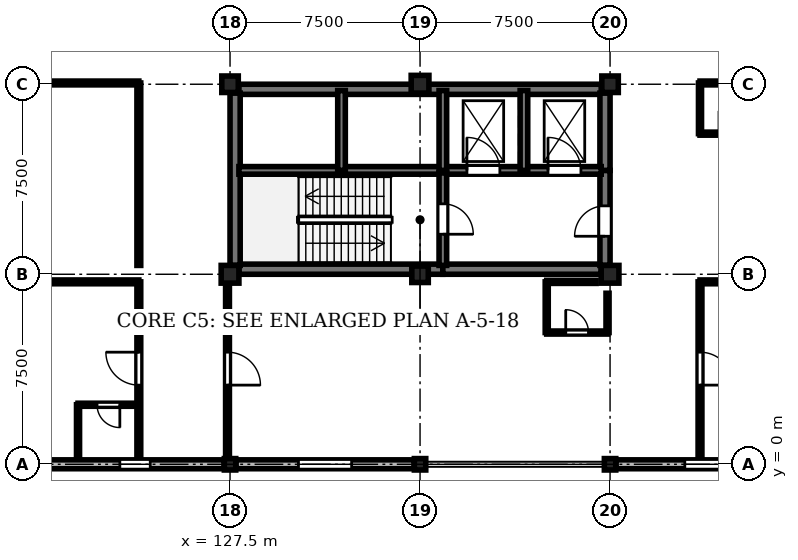
"""IFC4 building model, lengths in metres.
Left out: names, types, materials, properties, quantities, classifications, styles, units other than length and angle.
Written with IfcOpenShell. Run it as: python <this file> out.ifc"""

import sys

from ifc_helpers import new_model, si_unit, direction, frame, frame_2d, origin, origin_2d, place, context, subcontext, project, spatial, rectangle, extrude, element, fill, save


model = new_model("IFC4")
c1 = context("Model", 3, precision=1e-05, world=origin(), true_north=direction((0.0, 1.0)))
c2 = subcontext(c1, "Body", "Model", "MODEL_VIEW")
j1 = project(units=[si_unit("LENGTHUNIT", "METRE"), si_unit("PLANEANGLEUNIT", "RADIAN")], contexts=[c1])
p1 = place(None, origin())
s1 = spatial("IfcSite", under=j1, at=p1, CompositionType="ELEMENT")
p2 = place(p1, origin())
s2 = spatial("IfcBuilding", under=s1, at=p2, CompositionType="ELEMENT")
p3 = place(p2, frame((0.0, 0.0, 9.3)))
s3 = spatial("IfcBuildingStorey", under=s2, at=p3, CompositionType="ELEMENT", Elevation=9.3)
p4 = place(p3, frame((127.5, 0.0, 0.0), z_axis=(0.0, 0.0, 1.0), x_axis=(1.0, 0.0, 0.0)))
e1 = element("IfcColumn", 1, at=p4, inside=s3, PredefinedType="COLUMN", context=c2, shape_type="SweptSolid", body=[
    extrude(rectangle(XDim=0.45, YDim=0.45, at=origin_2d()), origin(), (0.0, 0.0, 1.0), 4.8),
])
p5 = place(p3, frame((127.5, 7.5, 0.0), z_axis=(0.0, 0.0, 1.0), x_axis=(1.0, 0.0, 0.0)))
e2 = element("IfcColumn", 2, at=p5, inside=s3, PredefinedType="COLUMN", context=c2, shape_type="SweptSolid", body=[
    extrude(rectangle(XDim=0.7, YDim=0.7, at=origin_2d()), origin(), (0.0, 0.0, 1.0), 4.8),
])
p6 = place(p3, frame((127.5, 15.0, 0.0), z_axis=(0.0, 0.0, 1.0), x_axis=(1.0, 0.0, 0.0)))
e3 = element("IfcColumn", 3, at=p6, inside=s3, PredefinedType="COLUMN", context=c2, shape_type="SweptSolid", body=[
    extrude(rectangle(XDim=0.65, YDim=0.65, at=origin_2d()), origin(), (0.0, 0.0, 1.0), 4.8),
])
p7 = place(p3, frame((135.0, 0.0, 0.0), z_axis=(0.0, 0.0, 1.0), x_axis=(1.0, 0.0, 0.0)))
e4 = element("IfcColumn", 4, at=p7, inside=s3, PredefinedType="COLUMN", context=c2, shape_type="SweptSolid", body=[
    extrude(rectangle(XDim=0.45, YDim=0.45, at=origin_2d()), origin(), (0.0, 0.0, 1.0), 4.8),
])
p8 = place(p3, frame((135.0, 7.5, 0.0), z_axis=(0.0, 0.0, 1.0), x_axis=(1.0, 0.0, 0.0)))
e5 = element("IfcColumn", 5, at=p8, inside=s3, PredefinedType="COLUMN", context=c2, shape_type="SweptSolid", body=[
    extrude(rectangle(XDim=0.65, YDim=0.65, at=origin_2d()), origin(), (0.0, 0.0, 1.0), 4.8),
])
p9 = place(p3, frame((135.0, 15.0, 0.0), z_axis=(0.0, 0.0, 1.0), x_axis=(1.0, 0.0, 0.0)))
e6 = element("IfcColumn", 6, at=p9, inside=s3, PredefinedType="COLUMN", context=c2, shape_type="SweptSolid", body=[
    extrude(rectangle(XDim=0.7, YDim=0.7, at=origin_2d()), origin(), (0.0, 0.0, 1.0), 4.8),
])
p10 = place(p3, frame((142.5, 0.0, 0.0), z_axis=(0.0, 0.0, 1.0), x_axis=(1.0, 0.0, 0.0)))
e7 = element("IfcColumn", 7, at=p10, inside=s3, PredefinedType="COLUMN", context=c2, shape_type="SweptSolid", body=[
    extrude(rectangle(XDim=0.45, YDim=0.45, at=origin_2d()), origin(), (0.0, 0.0, 1.0), 4.8),
])
p11 = place(p3, frame((142.5, 7.5, 0.0), z_axis=(0.0, 0.0, 1.0), x_axis=(1.0, 0.0, 0.0)))
e8 = element("IfcColumn", 8, at=p11, inside=s3, PredefinedType="COLUMN", context=c2, shape_type="SweptSolid", body=[
    extrude(rectangle(XDim=0.7, YDim=0.7, at=origin_2d()), origin(), (0.0, 0.0, 1.0), 4.8),
])
p12 = place(p3, frame((142.5, 15.0, 0.0), z_axis=(0.0, 0.0, 1.0), x_axis=(1.0, 0.0, 0.0)))
e9 = element("IfcColumn", 9, at=p12, inside=s3, PredefinedType="COLUMN", context=c2, shape_type="SweptSolid", body=[
    extrude(rectangle(XDim=0.65, YDim=0.65, at=origin_2d()), origin(), (0.0, 0.0, 1.0), 4.8),
])
p13 = place(p3, frame((127.265, 0.0, 0.0), z_axis=(0.0, 0.0, 1.0), x_axis=(-1.0, 0.0, 0.0)))
e10 = element("IfcWall", 10, at=p13, inside=s3, PredefinedType="STANDARD", context=c2, shape_type="SweptSolid", body=[
    extrude(rectangle(XDim=7.03, YDim=0.35, at=frame_2d((3.515, 0.0))), origin(), (0.0, 0.0, 1.0), 3.95),
])
p14 = place(p13, frame((2.915, 0.0, 0.9)))
e11 = element("IfcOpeningElement", 11, at=p14, cuts=e10, PredefinedType="OPENING", context=c2, shape_type="SweptSolid", body=[
    extrude(rectangle(XDim=1.2, YDim=2.1, at=frame_2d((0.6, 1.05))), frame((0.0, 0.185, 0.0), z_axis=(0.0, -1.0, 0.0), x_axis=(1.0, 0.0, 0.0)), (0.0, 0.0, 1.0), 0.37),
])
p15 = place(p3, frame((134.765, 0.0, 0.0), z_axis=(0.0, 0.0, 1.0), x_axis=(-1.0, 0.0, 0.0)))
e12 = element("IfcWall", 12, at=p15, inside=s3, PredefinedType="STANDARD", context=c2, shape_type="SweptSolid", body=[
    extrude(rectangle(XDim=7.03, YDim=0.35, at=frame_2d((3.515, 0.0))), origin(), (0.0, 0.0, 1.0), 3.95),
])
p16 = place(p15, frame((2.465, 0.0, 0.9)))
e13 = element("IfcOpeningElement", 13, at=p16, cuts=e12, PredefinedType="OPENING", context=c2, shape_type="SweptSolid", body=[
    extrude(rectangle(XDim=2.1, YDim=2.1, at=frame_2d((1.05, 1.05))), frame((0.0, 0.185, 0.0), z_axis=(0.0, -1.0, 0.0), x_axis=(1.0, 0.0, 0.0)), (0.0, 0.0, 1.0), 0.37),
])
p17 = place(p3, frame((149.765, 0.0, 0.0), z_axis=(0.0, 0.0, 1.0), x_axis=(-1.0, 0.0, 0.0)))
e14 = element("IfcWall", 14, at=p17, inside=s3, PredefinedType="STANDARD", context=c2, shape_type="SweptSolid", body=[
    extrude(rectangle(XDim=7.03, YDim=0.35, at=frame_2d((3.515, 0.0))), origin(), (0.0, 0.0, 1.0), 3.95),
])
p18 = place(p17, frame((2.715, 0.0, 0.9)))
e15 = element("IfcOpeningElement", 15, at=p18, cuts=e14, PredefinedType="OPENING", context=c2, shape_type="SweptSolid", body=[
    extrude(rectangle(XDim=1.6, YDim=1.95, at=frame_2d((0.8, 0.975))), frame((0.0, 0.185, 0.0), z_axis=(0.0, -1.0, 0.0), x_axis=(1.0, 0.0, 0.0)), (0.0, 0.0, 1.0), 0.37),
])
p19 = place(p3, frame((127.85, 7.7, 0.0), z_axis=(0.0, 0.0, 1.0), x_axis=(1.0, 0.0, 0.0)))
e16 = element("IfcWall", 16, at=p19, inside=s3, PredefinedType="SHEAR", context=c2, shape_type="SweptSolid", body=[
    extrude(rectangle(XDim=8.05, YDim=0.4, at=frame_2d((4.025, 0.0))), origin(), (0.0, 0.0, 1.0), 4.55),
])
p20 = place(p3, frame((135.9, 7.7, 0.0), z_axis=(0.0, 0.0, 1.0), x_axis=(1.0, 0.0, 0.0)))
e17 = element("IfcWall", 17, at=p20, inside=s3, PredefinedType="SHEAR", context=c2, shape_type="SweptSolid", body=[
    extrude(rectangle(XDim=6.25, YDim=0.4, at=frame_2d((3.125, 0.0))), origin(), (0.0, 0.0, 1.0), 4.55),
])
p21 = place(p3, frame((127.85, 14.8, 0.0), z_axis=(0.0, 0.0, 1.0), x_axis=(1.0, 0.0, 0.0)))
e18 = element("IfcWall", 18, at=p21, inside=s3, PredefinedType="SHEAR", context=c2, shape_type="SweptSolid", body=[
    extrude(rectangle(XDim=14.3, YDim=0.4, at=frame_2d((7.15, 0.0))), origin(), (0.0, 0.0, 1.0), 4.55),
])
p22 = place(p3, frame((127.7, 7.85, 0.0), z_axis=(0.0, 0.0, 1.0), x_axis=(0.0, 1.0, 0.0)))
e19 = element("IfcWall", 19, at=p22, inside=s3, PredefinedType="SHEAR", context=c2, shape_type="SweptSolid", body=[
    extrude(rectangle(XDim=6.8, YDim=0.4, at=frame_2d((3.4, 0.0))), origin(), (0.0, 0.0, 1.0), 4.55),
])
p23 = place(p3, frame((142.3, 7.85, 0.0), z_axis=(0.0, 0.0, 1.0), x_axis=(0.0, 1.0, 0.0)))
e20 = element("IfcWall", 20, at=p23, inside=s3, PredefinedType="SHEAR", context=c2, shape_type="SweptSolid", body=[
    extrude(rectangle(XDim=3.75, YDim=0.4, at=frame_2d((1.875, 0.0))), origin(), (0.0, 0.0, 1.0), 4.55),
])
p24 = place(p23, frame((1.15, 0.0, 0.0)))
e21 = element("IfcOpeningElement", 21, at=p24, cuts=e20, PredefinedType="OPENING", context=c2, shape_type="SweptSolid", body=[
    extrude(rectangle(XDim=1.2, YDim=2.25, at=frame_2d((0.6, 1.125))), frame((0.0, 0.21, 0.0), z_axis=(0.0, -1.0, 0.0), x_axis=(1.0, 0.0, 0.0)), (0.0, 0.0, 1.0), 0.42),
])
p25 = place(p3, frame((142.3, 11.6, 0.0), z_axis=(0.0, 0.0, 1.0), x_axis=(0.0, 1.0, 0.0)))
e22 = element("IfcWall", 22, at=p25, inside=s3, PredefinedType="SHEAR", context=c2, shape_type="SweptSolid", body=[
    extrude(rectangle(XDim=3.05, YDim=0.4, at=frame_2d((1.525, 0.0))), origin(), (0.0, 0.0, 1.0), 4.55),
])
p26 = place(p3, frame((127.85, 11.6, 0.0), z_axis=(0.0, 0.0, 1.0), x_axis=(1.0, 0.0, 0.0)))
e23 = element("IfcWall", 23, at=p26, inside=s3, PredefinedType="SHEAR", context=c2, shape_type="SweptSolid", body=[
    extrude(rectangle(XDim=8.05, YDim=0.3, at=frame_2d((4.025, 0.0))), origin(), (0.0, 0.0, 1.0), 4.55),
])
p27 = place(p3, frame((135.9, 11.6, 0.0), z_axis=(0.0, 0.0, 1.0), x_axis=(1.0, 0.0, 0.0)))
e24 = element("IfcWall", 24, at=p27, inside=s3, PredefinedType="SHEAR", context=c2, shape_type="SweptSolid", body=[
    extrude(rectangle(XDim=6.25, YDim=0.3, at=frame_2d((3.125, 0.0))), origin(), (0.0, 0.0, 1.0), 4.55),
])
p28 = place(p27, frame((0.95, 0.0, 0.0)))
e25 = element("IfcOpeningElement", 25, at=p28, cuts=e24, PredefinedType="OPENING", context=c2, shape_type="SweptSolid", body=[
    extrude(rectangle(XDim=1.3, YDim=2.2, at=frame_2d((0.65, 1.1))), frame((0.0, 0.16, 0.0), z_axis=(0.0, -1.0, 0.0), x_axis=(1.0, 0.0, 0.0)), (0.0, 0.0, 1.0), 0.32),
])
p29 = place(p27, frame((4.15, 0.0, 0.0)))
e26 = element("IfcOpeningElement", 26, at=p29, cuts=e24, PredefinedType="OPENING", context=c2, shape_type="SweptSolid", body=[
    extrude(rectangle(XDim=1.3, YDim=2.2, at=frame_2d((0.65, 1.1))), frame((0.0, 0.16, 0.0), z_axis=(0.0, -1.0, 0.0), x_axis=(1.0, 0.0, 0.0)), (0.0, 0.0, 1.0), 0.32),
])
p30 = place(p3, frame((135.9, 11.5, 0.0), z_axis=(0.0, 0.0, 1.0), x_axis=(0.0, -1.0, 0.0)))
e27 = element("IfcWall", 27, at=p30, inside=s3, PredefinedType="SHEAR", context=c2, shape_type="SweptSolid", body=[
    extrude(rectangle(XDim=3.65, YDim=0.3, at=frame_2d((1.825, 0.0))), origin(), (0.0, 0.0, 1.0), 4.55),
])
p31 = place(p30, frame((1.22, 0.0, 0.0)))
e28 = element("IfcOpeningElement", 28, at=p31, cuts=e27, PredefinedType="OPENING", context=c2, shape_type="SweptSolid", body=[
    extrude(rectangle(XDim=1.2, YDim=2.25, at=frame_2d((0.6, 1.125))), frame((0.0, 0.16, 0.0), z_axis=(0.0, -1.0, 0.0), x_axis=(1.0, 0.0, 0.0)), (0.0, 0.0, 1.0), 0.32),
])
for number, where, z_axis, x_axis in (
    (29, (131.9, 11.6, 0.0), (0.0, 0.0, 1.0), (0.0, 1.0, 0.0)),
    (30, (135.9, 11.6, 0.0), (0.0, 0.0, 1.0), (0.0, 1.0, 0.0)),
    (31, (139.1, 11.6, 0.0), (0.0, 0.0, 1.0), (0.0, 1.0, 0.0)),
):
    element("IfcWall", number, at=place(p3, frame(where, z_axis=z_axis, x_axis=x_axis)), inside=s3, PredefinedType="SHEAR", context=c2, shape_type="SweptSolid", body=[
        extrude(rectangle(XDim=3.15, YDim=0.3, at=frame_2d((1.575, 0.0))), origin(), (0.0, 0.0, 1.0), 4.55),
    ])
p32 = place(p3, frame((123.9, 0.35, 0.0), z_axis=(0.0, 0.0, 1.0), x_axis=(0.0, 1.0, 0.0)))
e32 = element("IfcWall", 32, at=p32, inside=s3, PredefinedType="PARTITIONING", context=c2, shape_type="SweptSolid", body=[
    extrude(rectangle(XDim=6.85, YDim=0.15, at=frame_2d((3.425, 0.0))), origin(), (0.0, 0.0, 1.0), 4.535),
])
p33 = place(p32, frame((2.775, 0.0, 0.0)))
e33 = element("IfcOpeningElement", 33, at=p33, cuts=e32, PredefinedType="OPENING", context=c2, shape_type="SweptSolid", body=[
    extrude(rectangle(XDim=1.3, YDim=2.2, at=frame_2d((0.65, 1.1))), frame((0.0, 0.085, 0.0), z_axis=(0.0, -1.0, 0.0), x_axis=(1.0, 0.0, 0.0)), (0.0, 0.0, 1.0), 0.17),
])
p34 = place(p3, frame((123.9, 2.35, 0.0), z_axis=(0.0, 0.0, 1.0), x_axis=(-1.0, 0.0, 0.0)))
e34 = element("IfcWall", 34, at=p34, inside=s3, PredefinedType="PARTITIONING", context=c2, shape_type="SweptSolid", body=[
    extrude(rectangle(XDim=2.4, YDim=0.12, at=frame_2d((1.2, 0.0))), origin(), (0.0, 0.0, 1.0), 4.535),
])
p35 = place(p34, frame((0.75, 0.0, 0.0)))
e35 = element("IfcOpeningElement", 35, at=p35, cuts=e34, PredefinedType="OPENING", context=c2, shape_type="SweptSolid", body=[
    extrude(rectangle(XDim=0.9, YDim=2.1, at=frame_2d((0.45, 1.05))), frame((0.0, 0.07, 0.0), z_axis=(0.0, -1.0, 0.0), x_axis=(1.0, 0.0, 0.0)), (0.0, 0.0, 1.0), 0.14),
])
p36 = place(p3, frame((121.5, 0.35, 0.0), z_axis=(0.0, 0.0, 1.0), x_axis=(0.0, 1.0, 0.0)))
e36 = element("IfcWall", 36, at=p36, inside=s3, PredefinedType="PARTITIONING", context=c2, shape_type="SweptSolid", body=[
    extrude(rectangle(XDim=2.0, YDim=0.12, at=frame_2d((1.0, 0.0))), origin(), (0.0, 0.0, 1.0), 4.535),
])
p37 = place(p3, frame((127.4, 7.2, 0.0), z_axis=(0.0, 0.0, 1.0), x_axis=(0.0, -1.0, 0.0)))
e37 = element("IfcWall", 37, at=p37, inside=s3, PredefinedType="PARTITIONING", context=c2, shape_type="SweptSolid", body=[
    extrude(rectangle(XDim=6.85, YDim=0.15, at=frame_2d((3.425, 0.0))), origin(), (0.0, 0.0, 1.0), 4.035),
])
p38 = place(p37, frame((2.775, 0.0, 0.0)))
e38 = element("IfcOpeningElement", 38, at=p38, cuts=e37, PredefinedType="OPENING", context=c2, shape_type="SweptSolid", body=[
    extrude(rectangle(XDim=1.3, YDim=2.2, at=frame_2d((0.65, 1.1))), frame((0.0, 0.085, 0.0), z_axis=(0.0, -1.0, 0.0), x_axis=(1.0, 0.0, 0.0)), (0.0, 0.0, 1.0), 0.17),
])
p39 = place(p3, frame((140.0, 5.2, 0.0), z_axis=(0.0, 0.0, 1.0), x_axis=(1.0, 0.0, 0.0)))
e39 = element("IfcWall", 39, at=p39, inside=s3, PredefinedType="PARTITIONING", context=c2, shape_type="SweptSolid", body=[
    extrude(rectangle(XDim=2.4, YDim=0.12, at=frame_2d((1.2, 0.0))), origin(), (0.0, 0.0, 1.0), 4.535),
])
p40 = place(p39, frame((0.75, 0.0, 0.0)))
e40 = element("IfcOpeningElement", 40, at=p40, cuts=e39, PredefinedType="OPENING", context=c2, shape_type="SweptSolid", body=[
    extrude(rectangle(XDim=0.9, YDim=2.1, at=frame_2d((0.45, 1.05))), frame((0.0, 0.07, 0.0), z_axis=(0.0, -1.0, 0.0), x_axis=(1.0, 0.0, 0.0)), (0.0, 0.0, 1.0), 0.14),
])
p41 = place(p3, frame((140.0, 5.2, 0.0), z_axis=(0.0, 0.0, 1.0), x_axis=(0.0, 1.0, 0.0)))
e41 = element("IfcWall", 41, at=p41, inside=s3, PredefinedType="PARTITIONING", context=c2, shape_type="SweptSolid", body=[
    extrude(rectangle(XDim=2.0, YDim=0.12, at=frame_2d((1.0, 0.0))), origin(), (0.0, 0.0, 1.0), 4.535),
])
p42 = place(p3, frame((146.05, 7.2, 0.0), z_axis=(0.0, 0.0, 1.0), x_axis=(0.0, -1.0, 0.0)))
e42 = element("IfcWall", 42, at=p42, inside=s3, PredefinedType="PARTITIONING", context=c2, shape_type="SweptSolid", body=[
    extrude(rectangle(XDim=6.85, YDim=0.15, at=frame_2d((3.425, 0.0))), origin(), (0.0, 0.0, 1.0), 4.535),
])
p43 = place(p42, frame((2.775, 0.0, 0.0)))
e43 = element("IfcOpeningElement", 43, at=p43, cuts=e42, PredefinedType="OPENING", context=c2, shape_type="SweptSolid", body=[
    extrude(rectangle(XDim=1.3, YDim=2.2, at=frame_2d((0.65, 1.1))), frame((0.0, 0.085, 0.0), z_axis=(0.0, -1.0, 0.0), x_axis=(1.0, 0.0, 0.0)), (0.0, 0.0, 1.0), 0.17),
])
p44 = place(p3, frame((172.15, 15.05, 0.0), z_axis=(0.0, 0.0, 1.0), x_axis=(-1.0, 0.0, 0.0)))
e44 = element("IfcWall", 44, at=p44, inside=s3, PredefinedType="PARTITIONING", context=c2, shape_type="SweptSolid", body=[
    extrude(rectangle(XDim=26.1, YDim=0.15, at=frame_2d((13.05, 0.0))), origin(), (0.0, 0.0, 1.0), 3.985),
])
p45 = place(p44, frame((2.68, 0.0, 0.0)))
e45 = element("IfcOpeningElement", 45, at=p45, cuts=e44, PredefinedType="OPENING", context=c2, shape_type="SweptSolid", body=[
    extrude(rectangle(XDim=1.3, YDim=2.2, at=frame_2d((0.65, 1.1))), frame((0.0, 0.085, 0.0), z_axis=(0.0, -1.0, 0.0), x_axis=(1.0, 0.0, 0.0)), (0.0, 0.0, 1.0), 0.17),
])
p46 = place(p3, frame((146.05, 13.05, 0.0), z_axis=(0.0, 0.0, 1.0), x_axis=(1.0, 0.0, 0.0)))
e46 = element("IfcWall", 46, at=p46, inside=s3, PredefinedType="PARTITIONING", context=c2, shape_type="SweptSolid", body=[
    extrude(rectangle(XDim=2.4, YDim=0.12, at=frame_2d((1.2, 0.0))), origin(), (0.0, 0.0, 1.0), 4.535),
])
p47 = place(p46, frame((0.75, 0.0, 0.0)))
e47 = element("IfcOpeningElement", 47, at=p47, cuts=e46, PredefinedType="OPENING", context=c2, shape_type="SweptSolid", body=[
    extrude(rectangle(XDim=0.9, YDim=2.1, at=frame_2d((0.45, 1.05))), frame((0.0, 0.07, 0.0), z_axis=(0.0, -1.0, 0.0), x_axis=(1.0, 0.0, 0.0)), (0.0, 0.0, 1.0), 0.14),
])
p48 = place(p3, frame((123.9, 15.05, 0.0), z_axis=(0.0, 0.0, 1.0), x_axis=(-1.0, 0.0, 0.0)))
e48 = element("IfcWall", 48, at=p48, inside=s3, PredefinedType="PARTITIONING", context=c2, shape_type="SweptSolid", body=[
    extrude(rectangle(XDim=11.05, YDim=0.15, at=frame_2d((5.525, 0.0))), origin(), (0.0, 0.0, 1.0), 3.985),
])
p49 = place(p48, frame((6.76, 0.0, 0.0)))
e49 = element("IfcOpeningElement", 49, at=p49, cuts=e48, PredefinedType="OPENING", context=c2, shape_type="SweptSolid", body=[
    extrude(rectangle(XDim=1.25, YDim=2.2, at=frame_2d((0.625, 1.1))), frame((0.0, 0.085, 0.0), z_axis=(0.0, -1.0, 0.0), x_axis=(1.0, 0.0, 0.0)), (0.0, 0.0, 1.0), 0.17),
])
p50 = place(p3, frame((112.85, 7.2, 0.0), z_axis=(0.0, 0.0, 1.0), x_axis=(1.0, 0.0, 0.0)))
e50 = element("IfcWall", 50, at=p50, inside=s3, PredefinedType="PARTITIONING", context=c2, shape_type="SweptSolid", body=[
    extrude(rectangle(XDim=11.05, YDim=0.15, at=frame_2d((5.525, 0.0))), origin(), (0.0, 0.0, 1.0), 3.985),
])
p51 = place(p3, frame((146.05, 7.2, 0.0), z_axis=(0.0, 0.0, 1.0), x_axis=(1.0, 0.0, 0.0)))
e51 = element("IfcWall", 51, at=p51, inside=s3, PredefinedType="PARTITIONING", context=c2, shape_type="SweptSolid", body=[
    extrude(rectangle(XDim=12.9, YDim=0.15, at=frame_2d((6.45, 0.0))), origin(), (0.0, 0.0, 1.0), 3.985),
])
p52 = place(p3, frame((123.9, 7.85, 0.0), z_axis=(0.0, 0.0, 1.0), x_axis=(0.0, 1.0, 0.0)))
e52 = element("IfcWall", 52, at=p52, inside=s3, PredefinedType="PARTITIONING", context=c2, shape_type="SweptSolid", body=[
    extrude(rectangle(XDim=7.2, YDim=0.15, at=frame_2d((3.6, 0.0))), origin(), (0.0, 0.0, 1.0), 4.535),
])
p53 = place(p3, frame((140.0, 7.2, 0.0), z_axis=(0.0, 0.0, 1.0), x_axis=(1.0, 0.0, 0.0)))
e53 = element("IfcWall", 53, at=p53, inside=s3, PredefinedType="PARTITIONING", context=c2, shape_type="SweptSolid", body=[
    extrude(rectangle(XDim=1.95, YDim=0.12, at=frame_2d((0.975, 0.0))), origin(), (0.0, 0.0, 1.0), 3.985),
])
p54 = place(p3, frame((142.4, 5.2, 0.0), z_axis=(0.0, 0.0, 1.0), x_axis=(0.0, 1.0, 0.0)))
e54 = element("IfcWall", 54, at=p54, inside=s3, PredefinedType="PARTITIONING", context=c2, shape_type="SweptSolid", body=[
    extrude(rectangle(XDim=1.55, YDim=0.12, at=frame_2d((0.775, 0.0))), origin(), (0.0, 0.0, 1.0), 4.035),
])
p55 = place(p3, frame((146.05, 13.05, 0.0), z_axis=(0.0, 0.0, 1.0), x_axis=(0.0, 1.0, 0.0)))
e55 = element("IfcWall", 55, at=p55, inside=s3, PredefinedType="PARTITIONING", context=c2, shape_type="SweptSolid", body=[
    extrude(rectangle(XDim=2.0, YDim=0.12, at=frame_2d((1.0, 0.0))), origin(), (0.0, 0.0, 1.0), 4.535),
])
p56 = place(p14, origin())
e56 = element("IfcWindow", 56, at=p56, inside=s3, PartitioningType="SINGLE_PANEL", PredefinedType="WINDOW", context=c2, shape_type="SweptSolid", body=[
    extrude(rectangle(XDim=1.2, YDim=2.1, at=frame_2d((0.6, 1.05))), frame((0.0, 0.03, 0.0), z_axis=(0.0, -1.0, 0.0), x_axis=(1.0, 0.0, 0.0)), (0.0, 0.0, 1.0), 0.06),
])
fill(e11, e56)
p57 = place(p16, origin())
e57 = element("IfcWindow", 57, at=p57, inside=s3, PartitioningType="SINGLE_PANEL", PredefinedType="WINDOW", context=c2, shape_type="SweptSolid", body=[
    extrude(rectangle(XDim=2.1, YDim=2.1, at=frame_2d((1.05, 1.05))), frame((0.0, 0.03, 0.0), z_axis=(0.0, -1.0, 0.0), x_axis=(1.0, 0.0, 0.0)), (0.0, 0.0, 1.0), 0.06),
])
fill(e13, e57)
p58 = place(p18, origin())
e58 = element("IfcWindow", 58, at=p58, inside=s3, PartitioningType="SINGLE_PANEL", PredefinedType="WINDOW", context=c2, shape_type="SweptSolid", body=[
    extrude(rectangle(XDim=1.6, YDim=1.95, at=frame_2d((0.8, 0.975))), frame((0.0, 0.03, 0.0), z_axis=(0.0, -1.0, 0.0), x_axis=(1.0, 0.0, 0.0)), (0.0, 0.0, 1.0), 0.06),
])
fill(e15, e58)
p59 = place(p24, origin())
e59 = element("IfcDoor", 59, at=p59, inside=s3, OperationType="SINGLE_SWING_LEFT", PredefinedType="DOOR", context=c2, shape_type="SweptSolid", body=[
    extrude(rectangle(XDim=1.2, YDim=2.25, at=frame_2d((0.6, 1.125))), frame((0.0, 0.025, 0.0), z_axis=(0.0, -1.0, 0.0), x_axis=(1.0, 0.0, 0.0)), (0.0, 0.0, 1.0), 0.05),
])
fill(e21, e59)
p60 = place(p28, origin())
e60 = element("IfcDoor", 60, at=p60, inside=s3, OperationType="DOUBLE_DOOR_SLIDING", PredefinedType="DOOR", context=c2, shape_type="SweptSolid", body=[
    extrude(rectangle(XDim=1.3, YDim=2.2, at=frame_2d((0.65, 1.1))), frame((0.0, 0.025, 0.0), z_axis=(0.0, -1.0, 0.0), x_axis=(1.0, 0.0, 0.0)), (0.0, 0.0, 1.0), 0.05),
])
fill(e25, e60)
p61 = place(p29, origin())
e61 = element("IfcDoor", 61, at=p61, inside=s3, OperationType="DOUBLE_DOOR_SLIDING", PredefinedType="DOOR", context=c2, shape_type="SweptSolid", body=[
    extrude(rectangle(XDim=1.3, YDim=2.2, at=frame_2d((0.65, 1.1))), frame((0.0, 0.025, 0.0), z_axis=(0.0, -1.0, 0.0), x_axis=(1.0, 0.0, 0.0)), (0.0, 0.0, 1.0), 0.05),
])
fill(e26, e61)
p62 = place(p31, origin())
e62 = element("IfcDoor", 62, at=p62, inside=s3, OperationType="SINGLE_SWING_RIGHT", PredefinedType="DOOR", context=c2, shape_type="SweptSolid", body=[
    extrude(rectangle(XDim=1.2, YDim=2.25, at=frame_2d((0.6, 1.125))), frame((0.0, 0.025, 0.0), z_axis=(0.0, -1.0, 0.0), x_axis=(1.0, 0.0, 0.0)), (0.0, 0.0, 1.0), 0.05),
])
fill(e28, e62)
p63 = place(p33, origin())
e63 = element("IfcDoor", 63, at=p63, inside=s3, OperationType="SINGLE_SWING_RIGHT", PredefinedType="DOOR", context=c2, shape_type="SweptSolid", body=[
    extrude(rectangle(XDim=1.3, YDim=2.2, at=frame_2d((0.65, 1.1))), frame((0.0, 0.025, 0.0), z_axis=(0.0, -1.0, 0.0), x_axis=(1.0, 0.0, 0.0)), (0.0, 0.0, 1.0), 0.05),
])
fill(e33, e63)
p64 = place(p35, origin())
e64 = element("IfcDoor", 64, at=p64, inside=s3, OperationType="SINGLE_SWING_LEFT", PredefinedType="DOOR", context=c2, shape_type="SweptSolid", body=[
    extrude(rectangle(XDim=0.9, YDim=2.1, at=frame_2d((0.45, 1.05))), frame((0.0, 0.025, 0.0), z_axis=(0.0, -1.0, 0.0), x_axis=(1.0, 0.0, 0.0)), (0.0, 0.0, 1.0), 0.05),
])
fill(e35, e64)
p65 = place(p38, origin())
e65 = element("IfcDoor", 65, at=p65, inside=s3, OperationType="SINGLE_SWING_RIGHT", PredefinedType="DOOR", context=c2, shape_type="SweptSolid", body=[
    extrude(rectangle(XDim=1.3, YDim=2.2, at=frame_2d((0.65, 1.1))), frame((0.0, 0.025, 0.0), z_axis=(0.0, -1.0, 0.0), x_axis=(1.0, 0.0, 0.0)), (0.0, 0.0, 1.0), 0.05),
])
fill(e38, e65)
p66 = place(p40, origin())
e66 = element("IfcDoor", 66, at=p66, inside=s3, OperationType="SINGLE_SWING_LEFT", PredefinedType="DOOR", context=c2, shape_type="SweptSolid", body=[
    extrude(rectangle(XDim=0.9, YDim=2.1, at=frame_2d((0.45, 1.05))), frame((0.0, 0.025, 0.0), z_axis=(0.0, -1.0, 0.0), x_axis=(1.0, 0.0, 0.0)), (0.0, 0.0, 1.0), 0.05),
])
fill(e40, e66)
p67 = place(p43, origin())
e67 = element("IfcDoor", 67, at=p67, inside=s3, OperationType="SINGLE_SWING_RIGHT", PredefinedType="DOOR", context=c2, shape_type="SweptSolid", body=[
    extrude(rectangle(XDim=1.3, YDim=2.2, at=frame_2d((0.65, 1.1))), frame((0.0, 0.025, 0.0), z_axis=(0.0, -1.0, 0.0), x_axis=(1.0, 0.0, 0.0)), (0.0, 0.0, 1.0), 0.05),
])
fill(e43, e67)
save(model, sys.argv[1])
